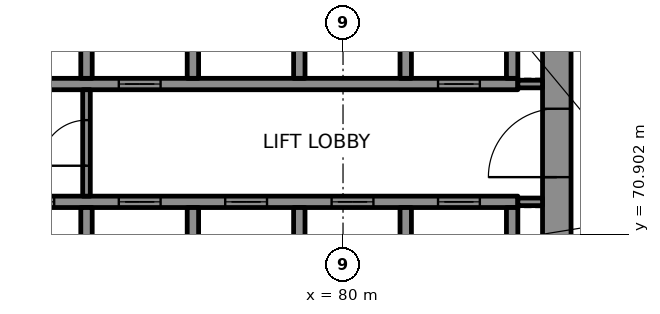
"""IFC4 building model, lengths in metres.
Left out: names, types, materials, properties, quantities, classifications, styles, units other than length and angle.
Written with IfcOpenShell. Run it as: python <this file> out.ifc"""

import sys

from ifc_helpers import new_model, si_unit, direction, frame, frame_2d, origin, place, context, subcontext, project, spatial, rectangle, extrude, element, fill, save


model = new_model("IFC4")
c1 = context("Model", 3, precision=1e-05, world=origin(), true_north=direction((0.0, 1.0)))
c2 = subcontext(c1, "Body", "Model", "MODEL_VIEW")
j1 = project(units=[si_unit("LENGTHUNIT", "METRE"), si_unit("PLANEANGLEUNIT", "RADIAN")], contexts=[c1])
p1 = place(None, origin())
s1 = spatial("IfcSite", under=j1, at=p1, CompositionType="ELEMENT")
p2 = place(p1, origin())
s2 = spatial("IfcBuilding", under=s1, at=p2, CompositionType="ELEMENT")
p3 = place(p2, frame((0.0, 0.0, 171.4)))
s3 = spatial("IfcBuildingStorey", under=s2, at=p3, CompositionType="ELEMENT", Elevation=171.4)
p4 = place(p3, frame((85.625, 67.75, 0.0), z_axis=(0.0, 0.0, 1.0), x_axis=(0.0, 1.0, 0.0)))
e1 = element("IfcWall", 1, at=p4, inside=s3, PredefinedType="SHEAR", context=c2, shape_type="SweptSolid", body=[
    extrude(rectangle(XDim=14.5, YDim=0.75, at=frame_2d((7.25, 0.0))), origin(), (0.0, 0.0, 1.0), 3.7),
])
p5 = place(p4, frame((4.65, 0.0, 0.0)))
e2 = element("IfcOpeningElement", 2, at=p5, cuts=e1, PredefinedType="OPENING", context=c2, shape_type="SweptSolid", body=[
    extrude(rectangle(XDim=1.8, YDim=2.1, at=frame_2d((0.9, 1.05))), frame((0.0, 0.385, 0.0), z_axis=(0.0, -1.0, 0.0), x_axis=(1.0, 0.0, 0.0)), (0.0, 0.0, 1.0), 0.77),
])
p6 = place(p4, frame((11.8, 0.0, 0.0)))
e3 = element("IfcOpeningElement", 3, at=p6, cuts=e1, PredefinedType="OPENING", context=c2, shape_type="SweptSolid", body=[
    extrude(rectangle(XDim=0.9, YDim=2.1, at=frame_2d((0.45, 1.05))), frame((0.0, 0.385, 0.0), z_axis=(0.0, -1.0, 0.0), x_axis=(1.0, 0.0, 0.0)), (0.0, 0.0, 1.0), 0.77),
])
p7 = place(p3, frame((70.3, 71.75, 0.0), z_axis=(0.0, 0.0, 1.0), x_axis=(1.0, 0.0, 0.0)))
e4 = element("IfcWall", 4, at=p7, inside=s3, PredefinedType="SHEAR", context=c2, shape_type="SweptSolid", body=[
    extrude(rectangle(XDim=14.3, YDim=0.3, at=frame_2d((7.15, 0.0))), origin(), (0.0, 0.0, 1.0), 3.7),
])
p8 = place(p7, frame((1.0, 0.0, 0.0)))
e5 = element("IfcOpeningElement", 5, at=p8, cuts=e4, PredefinedType="OPENING", context=c2, shape_type="SweptSolid", body=[
    extrude(rectangle(XDim=1.1, YDim=2.1, at=frame_2d((0.55, 1.05))), frame((0.0, 0.16, 0.0), z_axis=(0.0, -1.0, 0.0), x_axis=(1.0, 0.0, 0.0)), (0.0, 0.0, 1.0), 0.32),
])
p9 = place(p7, frame((3.8, 0.0, 0.0)))
e6 = element("IfcOpeningElement", 6, at=p9, cuts=e4, PredefinedType="OPENING", context=c2, shape_type="SweptSolid", body=[
    extrude(rectangle(XDim=1.1, YDim=2.1, at=frame_2d((0.55, 1.05))), frame((0.0, 0.16, 0.0), z_axis=(0.0, -1.0, 0.0), x_axis=(1.0, 0.0, 0.0)), (0.0, 0.0, 1.0), 0.32),
])
p10 = place(p7, frame((6.6, 0.0, 0.0)))
e7 = element("IfcOpeningElement", 7, at=p10, cuts=e4, PredefinedType="OPENING", context=c2, shape_type="SweptSolid", body=[
    extrude(rectangle(XDim=1.1, YDim=2.1, at=frame_2d((0.55, 1.05))), frame((0.0, 0.16, 0.0), z_axis=(0.0, -1.0, 0.0), x_axis=(1.0, 0.0, 0.0)), (0.0, 0.0, 1.0), 0.32),
])
p11 = place(p7, frame((9.4, 0.0, 0.0)))
e8 = element("IfcOpeningElement", 8, at=p11, cuts=e4, PredefinedType="OPENING", context=c2, shape_type="SweptSolid", body=[
    extrude(rectangle(XDim=1.1, YDim=2.1, at=frame_2d((0.55, 1.05))), frame((0.0, 0.16, 0.0), z_axis=(0.0, -1.0, 0.0), x_axis=(1.0, 0.0, 0.0)), (0.0, 0.0, 1.0), 0.32),
])
p12 = place(p7, frame((12.2, 0.0, 0.0)))
e9 = element("IfcOpeningElement", 9, at=p12, cuts=e4, PredefinedType="OPENING", context=c2, shape_type="SweptSolid", body=[
    extrude(rectangle(XDim=1.1, YDim=2.1, at=frame_2d((0.55, 1.05))), frame((0.0, 0.16, 0.0), z_axis=(0.0, -1.0, 0.0), x_axis=(1.0, 0.0, 0.0)), (0.0, 0.0, 1.0), 0.32),
])
p13 = place(p3, frame((70.3, 74.85, 0.0), z_axis=(0.0, 0.0, 1.0), x_axis=(1.0, 0.0, 0.0)))
e10 = element("IfcWall", 10, at=p13, inside=s3, PredefinedType="SHEAR", context=c2, shape_type="SweptSolid", body=[
    extrude(rectangle(XDim=14.3, YDim=0.3, at=frame_2d((7.15, 0.0))), origin(), (0.0, 0.0, 1.0), 3.7),
])
p14 = place(p13, frame((3.8, 0.0, 0.0)))
e11 = element("IfcOpeningElement", 11, at=p14, cuts=e10, PredefinedType="OPENING", context=c2, shape_type="SweptSolid", body=[
    extrude(rectangle(XDim=1.1, YDim=2.1, at=frame_2d((0.55, 1.05))), frame((0.0, 0.16, 0.0), z_axis=(0.0, -1.0, 0.0), x_axis=(1.0, 0.0, 0.0)), (0.0, 0.0, 1.0), 0.32),
])
p15 = place(p13, frame((12.2, 0.0, 0.0)))
e12 = element("IfcOpeningElement", 12, at=p15, cuts=e10, PredefinedType="OPENING", context=c2, shape_type="SweptSolid", body=[
    extrude(rectangle(XDim=1.1, YDim=2.1, at=frame_2d((0.55, 1.05))), frame((0.0, 0.16, 0.0), z_axis=(0.0, -1.0, 0.0), x_axis=(1.0, 0.0, 0.0)), (0.0, 0.0, 1.0), 0.32),
])
for number, where, z_axis, x_axis in (
    (13, (73.25, 69.0, 0.0), (0.0, 0.0, 1.0), (0.0, 1.0, 0.0)),
    (14, (73.25, 75.0, 0.0), (0.0, 0.0, 1.0), (0.0, 1.0, 0.0)),
    (15, (76.05, 69.0, 0.0), (0.0, 0.0, 1.0), (0.0, 1.0, 0.0)),
    (16, (76.05, 75.0, 0.0), (0.0, 0.0, 1.0), (0.0, 1.0, 0.0)),
    (17, (78.85, 69.0, 0.0), (0.0, 0.0, 1.0), (0.0, 1.0, 0.0)),
    (18, (78.85, 75.0, 0.0), (0.0, 0.0, 1.0), (0.0, 1.0, 0.0)),
    (19, (81.65, 69.0, 0.0), (0.0, 0.0, 1.0), (0.0, 1.0, 0.0)),
    (20, (81.65, 75.0, 0.0), (0.0, 0.0, 1.0), (0.0, 1.0, 0.0)),
    (21, (84.45, 69.0, 0.0), (0.0, 0.0, 1.0), (0.0, 1.0, 0.0)),
    (22, (84.45, 75.0, 0.0), (0.0, 0.0, 1.0), (0.0, 1.0, 0.0)),
):
    element("IfcWall", number, at=place(p3, frame(where, z_axis=z_axis, x_axis=x_axis)), inside=s3, PredefinedType="SHEAR", context=c2, shape_type="SweptSolid", body=[
        extrude(rectangle(XDim=2.6, YDim=0.3, at=frame_2d((1.3, 0.0))), origin(), (0.0, 0.0, 1.0), 3.7),
    ])
for number, where, z_axis, x_axis in (
    (23, (84.6, 71.75, 0.0), (0.0, 0.0, 1.0), (1.0, 0.0, 0.0)),
    (24, (84.6, 74.85, 0.0), (0.0, 0.0, 1.0), (1.0, 0.0, 0.0)),
):
    element("IfcWall", number, at=place(p3, frame(where, z_axis=z_axis, x_axis=x_axis)), inside=s3, PredefinedType="PARTITIONING", context=c2, shape_type="SweptSolid", body=[
        extrude(rectangle(XDim=0.65, YDim=0.2, at=frame_2d((0.325, 0.0))), origin(), (0.0, 0.0, 1.0), 3.7),
    ])
p16 = place(p3, frame((73.25, 71.9, 0.0), z_axis=(0.0, 0.0, 1.0), x_axis=(0.0, 1.0, 0.0)))
e25 = element("IfcWall", 25, at=p16, inside=s3, PredefinedType="PARTITIONING", context=c2, shape_type="SweptSolid", body=[
    extrude(rectangle(XDim=2.8, YDim=0.2, at=frame_2d((1.4, 0.0))), origin(), (0.0, 0.0, 1.0), 3.7),
])
p17 = place(p16, frame((0.8, 0.0, 0.0)))
e26 = element("IfcOpeningElement", 26, at=p17, cuts=e25, PredefinedType="OPENING", context=c2, shape_type="SweptSolid", body=[
    extrude(rectangle(XDim=1.2, YDim=2.1, at=frame_2d((0.6, 1.05))), frame((0.0, 0.11, 0.0), z_axis=(0.0, -1.0, 0.0), x_axis=(1.0, 0.0, 0.0)), (0.0, 0.0, 1.0), 0.22),
])
p18 = place(p8, origin())
e27 = element("IfcDoor", 27, at=p18, inside=s3, OperationType="DOUBLE_DOOR_SLIDING", PredefinedType="DOOR", context=c2, shape_type="SweptSolid", body=[
    extrude(rectangle(XDim=1.1, YDim=2.1, at=frame_2d((0.55, 1.05))), frame((0.0, 0.025, 0.0), z_axis=(0.0, -1.0, 0.0), x_axis=(1.0, 0.0, 0.0)), (0.0, 0.0, 1.0), 0.05),
])
fill(e5, e27)
p19 = place(p9, origin())
e28 = element("IfcDoor", 28, at=p19, inside=s3, OperationType="DOUBLE_DOOR_SLIDING", PredefinedType="DOOR", context=c2, shape_type="SweptSolid", body=[
    extrude(rectangle(XDim=1.1, YDim=2.1, at=frame_2d((0.55, 1.05))), frame((0.0, 0.025, 0.0), z_axis=(0.0, -1.0, 0.0), x_axis=(1.0, 0.0, 0.0)), (0.0, 0.0, 1.0), 0.05),
])
fill(e6, e28)
p20 = place(p10, origin())
e29 = element("IfcDoor", 29, at=p20, inside=s3, OperationType="DOUBLE_DOOR_SLIDING", PredefinedType="DOOR", context=c2, shape_type="SweptSolid", body=[
    extrude(rectangle(XDim=1.1, YDim=2.1, at=frame_2d((0.55, 1.05))), frame((0.0, 0.025, 0.0), z_axis=(0.0, -1.0, 0.0), x_axis=(1.0, 0.0, 0.0)), (0.0, 0.0, 1.0), 0.05),
])
fill(e7, e29)
p21 = place(p11, origin())
e30 = element("IfcDoor", 30, at=p21, inside=s3, OperationType="DOUBLE_DOOR_SLIDING", PredefinedType="DOOR", context=c2, shape_type="SweptSolid", body=[
    extrude(rectangle(XDim=1.1, YDim=2.1, at=frame_2d((0.55, 1.05))), frame((0.0, 0.025, 0.0), z_axis=(0.0, -1.0, 0.0), x_axis=(1.0, 0.0, 0.0)), (0.0, 0.0, 1.0), 0.05),
])
fill(e8, e30)
p22 = place(p12, origin())
e31 = element("IfcDoor", 31, at=p22, inside=s3, OperationType="DOUBLE_DOOR_SLIDING", PredefinedType="DOOR", context=c2, shape_type="SweptSolid", body=[
    extrude(rectangle(XDim=1.1, YDim=2.1, at=frame_2d((0.55, 1.05))), frame((0.0, 0.025, 0.0), z_axis=(0.0, -1.0, 0.0), x_axis=(1.0, 0.0, 0.0)), (0.0, 0.0, 1.0), 0.05),
])
fill(e9, e31)
p23 = place(p14, origin())
e32 = element("IfcDoor", 32, at=p23, inside=s3, OperationType="DOUBLE_DOOR_SLIDING", PredefinedType="DOOR", context=c2, shape_type="SweptSolid", body=[
    extrude(rectangle(XDim=1.1, YDim=2.1, at=frame_2d((0.55, 1.05))), frame((0.0, 0.025, 0.0), z_axis=(0.0, -1.0, 0.0), x_axis=(1.0, 0.0, 0.0)), (0.0, 0.0, 1.0), 0.05),
])
fill(e11, e32)
p24 = place(p15, origin())
e33 = element("IfcDoor", 33, at=p24, inside=s3, OperationType="DOUBLE_DOOR_SLIDING", PredefinedType="DOOR", context=c2, shape_type="SweptSolid", body=[
    extrude(rectangle(XDim=1.1, YDim=2.1, at=frame_2d((0.55, 1.05))), frame((0.0, 0.025, 0.0), z_axis=(0.0, -1.0, 0.0), x_axis=(1.0, 0.0, 0.0)), (0.0, 0.0, 1.0), 0.05),
])
fill(e12, e33)
p25 = place(p17, origin())
e34 = element("IfcDoor", 34, at=p25, inside=s3, OperationType="SINGLE_SWING_LEFT", PredefinedType="DOOR", context=c2, shape_type="SweptSolid", body=[
    extrude(rectangle(XDim=1.2, YDim=2.1, at=frame_2d((0.6, 1.05))), frame((0.0, 0.025, 0.0), z_axis=(0.0, -1.0, 0.0), x_axis=(1.0, 0.0, 0.0)), (0.0, 0.0, 1.0), 0.05),
])
fill(e26, e34)
p26 = place(p5, origin())
e35 = element("IfcDoor", 35, at=p26, inside=s3, OperationType="SINGLE_SWING_RIGHT", PredefinedType="DOOR", context=c2, shape_type="SweptSolid", body=[
    extrude(rectangle(XDim=1.8, YDim=2.1, at=frame_2d((0.9, 1.05))), frame((0.0, 0.095, 0.0), z_axis=(0.0, -1.0, 0.0), x_axis=(1.0, 0.0, 0.0)), (0.0, 0.0, 1.0), 0.19),
])
fill(e2, e35)
save(model, sys.argv[1])
